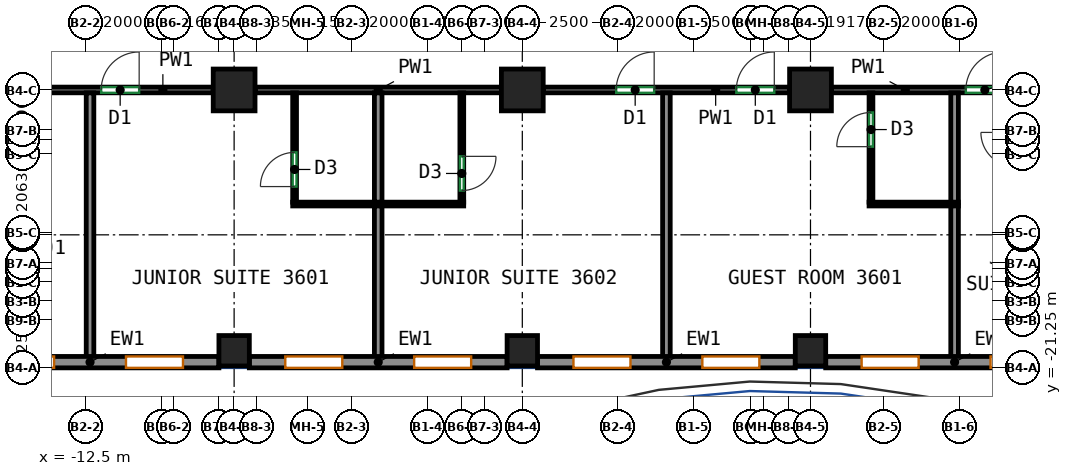
"""IFC4 building model, lengths in metres.
Left out: names, types, materials, properties, quantities, classifications, styles, units other than length and angle.
Written with IfcOpenShell. Run it as: python <this file> out.ifc"""

import sys

from ifc_helpers import new_model, si_unit, direction, frame, frame_2d, origin, origin_2d, place, context, subcontext, project, spatial, rectangle, extrude, source, transform, mapped, element, fill, save


model = new_model("IFC4")
c1 = context("Model", 3, precision=1e-05, world=origin(), true_north=direction((0.0, 1.0)))
c2 = subcontext(c1, "Body", "Model", "MODEL_VIEW")
j1 = project(units=[si_unit("LENGTHUNIT", "METRE"), si_unit("PLANEANGLEUNIT", "RADIAN")], contexts=[c1])
p1 = place(None, origin())
s1 = spatial("IfcSite", under=j1, at=p1, CompositionType="ELEMENT")
p2 = place(p1, origin())
s2 = spatial("IfcBuilding", under=s1, at=p2, CompositionType="ELEMENT")
p3 = place(p2, frame((0.0, 0.0, 157.5)))
s3 = spatial("IfcBuildingStorey", under=s2, at=p3, CompositionType="ELEMENT", Elevation=157.5)
m1 = source(origin(), c2, "Body", "SweptSolid", [
    extrude(rectangle(XDim=0.8, YDim=0.8, at=origin_2d()), origin(), (0.0, 0.0, 1.0), 3.12),
])
p4 = place(p3, frame((-8.583, -20.8, 0.0), z_axis=(0.0, 0.0, 1.0), x_axis=(1.0, 0.0, 0.0)))
e1 = element("IfcColumn", 1, at=p4, inside=s3, PredefinedType="COLUMN", context=c2, shape_type="MappedRepresentation", body=[
    mapped(m1, transform((0.0, 0.0, 0.0))),
])
m2 = source(origin(), c2, "Body", "SweptSolid", [
    extrude(rectangle(XDim=1.1, YDim=1.1, at=origin_2d()), origin(), (0.0, 0.0, 1.0), 3.12),
])
p5 = place(p3, frame((-8.583, -13.938, 0.0), z_axis=(0.0, 0.0, 1.0), x_axis=(1.0, 0.0, 0.0)))
e2 = element("IfcColumn", 2, at=p5, inside=s3, PredefinedType="COLUMN", context=c2, shape_type="MappedRepresentation", body=[
    mapped(m2, transform((0.0, 0.0, 0.0))),
])
p6 = place(p3, frame((-1.0, -20.8, 0.0), z_axis=(0.0, 0.0, 1.0), x_axis=(1.0, 0.0, 0.0)))
e3 = element("IfcColumn", 3, at=p6, inside=s3, PredefinedType="COLUMN", context=c2, shape_type="MappedRepresentation", body=[
    mapped(m1, transform((0.0, 0.0, 0.0))),
])
p7 = place(p3, frame((-1.0, -13.938, 0.0), z_axis=(0.0, 0.0, 1.0), x_axis=(1.0, 0.0, 0.0)))
e4 = element("IfcColumn", 4, at=p7, inside=s3, PredefinedType="COLUMN", context=c2, shape_type="MappedRepresentation", body=[
    mapped(m2, transform((0.0, 0.0, 0.0))),
])
p8 = place(p3, frame((6.583, -20.8, 0.0), z_axis=(0.0, 0.0, 1.0), x_axis=(1.0, 0.0, 0.0)))
e5 = element("IfcColumn", 5, at=p8, inside=s3, PredefinedType="COLUMN", context=c2, shape_type="MappedRepresentation", body=[
    mapped(m1, transform((0.0, 0.0, 0.0))),
])
p9 = place(p3, frame((6.583, -13.938, 0.0), z_axis=(0.0, 0.0, 1.0), x_axis=(1.0, 0.0, 0.0)))
e6 = element("IfcColumn", 6, at=p9, inside=s3, PredefinedType="COLUMN", context=c2, shape_type="MappedRepresentation", body=[
    mapped(m2, transform((0.0, 0.0, 0.0))),
])
m3 = source(origin(), c2, "Body", "SweptSolid", [
    extrude(rectangle(XDim=6.783, YDim=0.3, at=frame_2d((3.392, 0.0))), origin(), (0.0, 0.0, 1.0), 3.12),
])
p10 = place(p3, frame((-15.767, -21.1, 0.0), z_axis=(0.0, 0.0, 1.0), x_axis=(1.0, 0.0, 0.0)))
e7 = element("IfcWall", 7, at=p10, inside=s3, PredefinedType="SOLIDWALL", context=c2, shape_type="MappedRepresentation", body=[
    mapped(m3, transform((0.0, 0.0, 0.0))),
])
p11 = place(p10, frame((0.946, 0.0, 0.85)))
e8 = element("IfcOpeningElement", 8, at=p11, cuts=e7, PredefinedType="OPENING", context=c2, shape_type="SweptSolid", body=[
    extrude(rectangle(XDim=1.5, YDim=1.95, at=frame_2d((0.75, 0.975))), frame((0.0, 0.16, 0.0), z_axis=(0.0, -1.0, 0.0), x_axis=(1.0, 0.0, 0.0)), (0.0, 0.0, 1.0), 0.32),
])
p12 = place(p10, frame((4.338, 0.0, 0.85)))
e9 = element("IfcOpeningElement", 9, at=p12, cuts=e7, PredefinedType="OPENING", context=c2, shape_type="SweptSolid", body=[
    extrude(rectangle(XDim=1.5, YDim=1.95, at=frame_2d((0.75, 0.975))), frame((0.0, 0.16, 0.0), z_axis=(0.0, -1.0, 0.0), x_axis=(1.0, 0.0, 0.0)), (0.0, 0.0, 1.0), 0.32),
])
m4 = source(origin(), c2, "Body", "SweptSolid", [
    extrude(rectangle(XDim=6.783, YDim=0.3, at=frame_2d((3.392, 0.0))), origin(), (0.0, 0.0, 1.0), 3.12),
])
p13 = place(p3, frame((-8.183, -21.1, 0.0), z_axis=(0.0, 0.0, 1.0), x_axis=(1.0, 0.0, 0.0)))
e10 = element("IfcWall", 10, at=p13, inside=s3, PredefinedType="SOLIDWALL", context=c2, shape_type="MappedRepresentation", body=[
    mapped(m4, transform((0.0, 0.0, 0.0))),
])
p14 = place(p13, frame((0.946, 0.0, 0.85)))
e11 = element("IfcOpeningElement", 11, at=p14, cuts=e10, PredefinedType="OPENING", context=c2, shape_type="SweptSolid", body=[
    extrude(rectangle(XDim=1.5, YDim=1.95, at=frame_2d((0.75, 0.975))), frame((0.0, 0.16, 0.0), z_axis=(0.0, -1.0, 0.0), x_axis=(1.0, 0.0, 0.0)), (0.0, 0.0, 1.0), 0.32),
])
p15 = place(p13, frame((4.337, 0.0, 0.85)))
e12 = element("IfcOpeningElement", 12, at=p15, cuts=e10, PredefinedType="OPENING", context=c2, shape_type="SweptSolid", body=[
    extrude(rectangle(XDim=1.5, YDim=1.95, at=frame_2d((0.75, 0.975))), frame((0.0, 0.16, 0.0), z_axis=(0.0, -1.0, 0.0), x_axis=(1.0, 0.0, 0.0)), (0.0, 0.0, 1.0), 0.32),
])
p16 = place(p3, frame((-0.6, -21.1, 0.0), z_axis=(0.0, 0.0, 1.0), x_axis=(1.0, 0.0, 0.0)))
e13 = element("IfcWall", 13, at=p16, inside=s3, PredefinedType="SOLIDWALL", context=c2, shape_type="MappedRepresentation", body=[
    mapped(m4, transform((0.0, 0.0, 0.0))),
])
p17 = place(p16, frame((0.946, 0.0, 0.85)))
e14 = element("IfcOpeningElement", 14, at=p17, cuts=e13, PredefinedType="OPENING", context=c2, shape_type="SweptSolid", body=[
    extrude(rectangle(XDim=1.5, YDim=1.95, at=frame_2d((0.75, 0.975))), frame((0.0, 0.16, 0.0), z_axis=(0.0, -1.0, 0.0), x_axis=(1.0, 0.0, 0.0)), (0.0, 0.0, 1.0), 0.32),
])
p18 = place(p16, frame((4.337, 0.0, 0.85)))
e15 = element("IfcOpeningElement", 15, at=p18, cuts=e13, PredefinedType="OPENING", context=c2, shape_type="SweptSolid", body=[
    extrude(rectangle(XDim=1.5, YDim=1.95, at=frame_2d((0.75, 0.975))), frame((0.0, 0.16, 0.0), z_axis=(0.0, -1.0, 0.0), x_axis=(1.0, 0.0, 0.0)), (0.0, 0.0, 1.0), 0.32),
])
p19 = place(p3, frame((6.983, -21.1, 0.0), z_axis=(0.0, 0.0, 1.0), x_axis=(1.0, 0.0, 0.0)))
e16 = element("IfcWall", 16, at=p19, inside=s3, PredefinedType="SOLIDWALL", context=c2, shape_type="MappedRepresentation", body=[
    mapped(m3, transform((0.0, 0.0, 0.0))),
])
p20 = place(p19, frame((0.946, 0.0, 0.85)))
e17 = element("IfcOpeningElement", 17, at=p20, cuts=e16, PredefinedType="OPENING", context=c2, shape_type="SweptSolid", body=[
    extrude(rectangle(XDim=1.5, YDim=1.95, at=frame_2d((0.75, 0.975))), frame((0.0, 0.16, 0.0), z_axis=(0.0, -1.0, 0.0), x_axis=(1.0, 0.0, 0.0)), (0.0, 0.0, 1.0), 0.32),
])
p21 = place(p19, frame((4.338, 0.0, 0.85)))
e18 = element("IfcOpeningElement", 18, at=p21, cuts=e16, PredefinedType="OPENING", context=c2, shape_type="SweptSolid", body=[
    extrude(rectangle(XDim=1.5, YDim=1.95, at=frame_2d((0.75, 0.975))), frame((0.0, 0.16, 0.0), z_axis=(0.0, -1.0, 0.0), x_axis=(1.0, 0.0, 0.0)), (0.0, 0.0, 1.0), 0.32),
])
p22 = place(p3, frame((-13.55, -13.938, 0.0), z_axis=(0.0, 0.0, 1.0), x_axis=(1.0, 0.0, 0.0)))
e19 = element("IfcWall", 19, at=p22, inside=s3, PredefinedType="PARTITIONING", context=c2, shape_type="SweptSolid", body=[
    extrude(rectangle(XDim=4.417, YDim=0.15, at=frame_2d((2.208, 0.0))), origin(), (0.0, 0.0, 1.0), 3.12),
])
p23 = place(p22, frame((1.468, 0.0, 0.0)))
e20 = element("IfcOpeningElement", 20, at=p23, cuts=e19, PredefinedType="OPENING", context=c2, shape_type="SweptSolid", body=[
    extrude(rectangle(XDim=1.0, YDim=2.1, at=frame_2d((0.5, 1.05))), frame((0.0, 0.085, 0.0), z_axis=(0.0, -1.0, 0.0), x_axis=(1.0, 0.0, 0.0)), (0.0, 0.0, 1.0), 0.17),
])
p24 = place(p3, frame((-8.033, -13.938, 0.0), z_axis=(0.0, 0.0, 1.0), x_axis=(1.0, 0.0, 0.0)))
e21 = element("IfcWall", 21, at=p24, inside=s3, PredefinedType="PARTITIONING", context=c2, shape_type="SweptSolid", body=[
    extrude(rectangle(XDim=6.483, YDim=0.15, at=frame_2d((3.241, 0.0))), origin(), (0.0, 0.0, 1.0), 3.12),
])
p25 = place(p3, frame((-0.45, -13.938, 0.0), z_axis=(0.0, 0.0, 1.0), x_axis=(1.0, 0.0, 0.0)))
e22 = element("IfcWall", 22, at=p25, inside=s3, PredefinedType="PARTITIONING", context=c2, shape_type="SweptSolid", body=[
    extrude(rectangle(XDim=6.483, YDim=0.15, at=frame_2d((3.241, 0.0))), origin(), (0.0, 0.0, 1.0), 3.12),
])
p26 = place(p25, frame((1.92, 0.0, 0.0)))
e23 = element("IfcOpeningElement", 23, at=p26, cuts=e22, PredefinedType="OPENING", context=c2, shape_type="SweptSolid", body=[
    extrude(rectangle(XDim=1.0, YDim=2.1, at=frame_2d((0.5, 1.05))), frame((0.0, 0.085, 0.0), z_axis=(0.0, -1.0, 0.0), x_axis=(1.0, 0.0, 0.0)), (0.0, 0.0, 1.0), 0.17),
])
p27 = place(p25, frame((5.081, 0.0, 0.0)))
e24 = element("IfcOpeningElement", 24, at=p27, cuts=e22, PredefinedType="OPENING", context=c2, shape_type="SweptSolid", body=[
    extrude(rectangle(XDim=1.0, YDim=2.1, at=frame_2d((0.5, 1.05))), frame((0.0, 0.085, 0.0), z_axis=(0.0, -1.0, 0.0), x_axis=(1.0, 0.0, 0.0)), (0.0, 0.0, 1.0), 0.17),
])
p28 = place(p3, frame((7.133, -13.938, 0.0), z_axis=(0.0, 0.0, 1.0), x_axis=(1.0, 0.0, 0.0)))
e25 = element("IfcWall", 25, at=p28, inside=s3, PredefinedType="PARTITIONING", context=c2, shape_type="SweptSolid", body=[
    extrude(rectangle(XDim=6.484, YDim=0.15, at=frame_2d((3.242, 0.0))), origin(), (0.0, 0.0, 1.0), 3.12),
])
p29 = place(p28, frame((3.538, 0.0, 0.0)))
e26 = element("IfcOpeningElement", 26, at=p29, cuts=e25, PredefinedType="OPENING", context=c2, shape_type="SweptSolid", body=[
    extrude(rectangle(XDim=1.0, YDim=2.1, at=frame_2d((0.5, 1.05))), frame((0.0, 0.085, 0.0), z_axis=(0.0, -1.0, 0.0), x_axis=(1.0, 0.0, 0.0)), (0.0, 0.0, 1.0), 0.17),
])
p30 = place(p3, frame((-12.375, -21.0, 0.0), z_axis=(0.0, 0.0, 1.0), x_axis=(0.0, 1.0, 0.0)))
e27 = element("IfcWall", 27, at=p30, inside=s3, PredefinedType="PARTITIONING", context=c2, shape_type="SweptSolid", body=[
    extrude(rectangle(XDim=6.985, YDim=0.2, at=frame_2d((3.493, 0.0))), origin(), (0.0, 0.0, 1.0), 3.12),
])
p31 = place(p3, frame((-6.992, -16.89, 0.0), z_axis=(0.0, 0.0, 1.0), x_axis=(0.0, 1.0, 0.0)))
e28 = element("IfcWall", 28, at=p31, inside=s3, PredefinedType="PARTITIONING", context=c2, shape_type="SweptSolid", body=[
    extrude(rectangle(XDim=2.875, YDim=0.1, at=frame_2d((1.438, 0.0))), origin(), (0.0, 0.0, 1.0), 3.12),
])
p32 = place(p31, frame((0.41, 0.0, 0.0)))
e29 = element("IfcOpeningElement", 29, at=p32, cuts=e28, PredefinedType="OPENING", context=c2, shape_type="SweptSolid", body=[
    extrude(rectangle(XDim=0.9, YDim=2.1, at=frame_2d((0.45, 1.05))), frame((0.0, 0.06, 0.0), z_axis=(0.0, -1.0, 0.0), x_axis=(1.0, 0.0, 0.0)), (0.0, 0.0, 1.0), 0.12),
])
p33 = place(p3, frame((-7.042, -16.94, 0.0), z_axis=(0.0, 0.0, 1.0), x_axis=(1.0, 0.0, 0.0)))
e30 = element("IfcWall", 30, at=p33, inside=s3, PredefinedType="PARTITIONING", context=c2, shape_type="SweptSolid", body=[
    extrude(rectangle(XDim=4.5, YDim=0.1, at=frame_2d((2.25, 0.0))), origin(), (0.0, 0.0, 1.0), 3.12),
])
p34 = place(p3, frame((-4.792, -21.0, 0.0), z_axis=(0.0, 0.0, 1.0), x_axis=(0.0, 1.0, 0.0)))
e31 = element("IfcWall", 31, at=p34, inside=s3, PredefinedType="PARTITIONING", context=c2, shape_type="SweptSolid", body=[
    extrude(rectangle(XDim=4.01, YDim=0.2, at=frame_2d((2.005, 0.0))), origin(), (0.0, 0.0, 1.0), 3.12),
])
p35 = place(p3, frame((-4.792, -16.89, 0.0), z_axis=(0.0, 0.0, 1.0), x_axis=(0.0, 1.0, 0.0)))
e32 = element("IfcWall", 32, at=p35, inside=s3, PredefinedType="PARTITIONING", context=c2, shape_type="SweptSolid", body=[
    extrude(rectangle(XDim=2.875, YDim=0.2, at=frame_2d((1.438, 0.0))), origin(), (0.0, 0.0, 1.0), 3.12),
])
p36 = place(p3, frame((-2.592, -14.015, 0.0), z_axis=(0.0, 0.0, 1.0), x_axis=(0.0, -1.0, 0.0)))
e33 = element("IfcWall", 33, at=p36, inside=s3, PredefinedType="PARTITIONING", context=c2, shape_type="SweptSolid", body=[
    extrude(rectangle(XDim=2.875, YDim=0.1, at=frame_2d((1.438, 0.0))), origin(), (0.0, 0.0, 1.0), 3.12),
])
p37 = place(p36, frame((1.67, 0.0, 0.0)))
e34 = element("IfcOpeningElement", 34, at=p37, cuts=e33, PredefinedType="OPENING", context=c2, shape_type="SweptSolid", body=[
    extrude(rectangle(XDim=0.9, YDim=2.1, at=frame_2d((0.45, 1.05))), frame((0.0, 0.06, 0.0), z_axis=(0.0, -1.0, 0.0), x_axis=(1.0, 0.0, 0.0)), (0.0, 0.0, 1.0), 0.12),
])
p38 = place(p3, frame((2.792, -21.0, 0.0), z_axis=(0.0, 0.0, 1.0), x_axis=(0.0, 1.0, 0.0)))
e35 = element("IfcWall", 35, at=p38, inside=s3, PredefinedType="PARTITIONING", context=c2, shape_type="SweptSolid", body=[
    extrude(rectangle(XDim=6.985, YDim=0.2, at=frame_2d((3.493, 0.0))), origin(), (0.0, 0.0, 1.0), 3.12),
])
p39 = place(p3, frame((8.175, -16.89, 0.0), z_axis=(0.0, 0.0, 1.0), x_axis=(0.0, 1.0, 0.0)))
e36 = element("IfcWall", 36, at=p39, inside=s3, PredefinedType="PARTITIONING", context=c2, shape_type="SweptSolid", body=[
    extrude(rectangle(XDim=2.875, YDim=0.1, at=frame_2d((1.438, 0.0))), origin(), (0.0, 0.0, 1.0), 3.12),
])
p40 = place(p39, frame((1.46, 0.0, 0.0)))
e37 = element("IfcOpeningElement", 37, at=p40, cuts=e36, PredefinedType="OPENING", context=c2, shape_type="SweptSolid", body=[
    extrude(rectangle(XDim=0.9, YDim=2.1, at=frame_2d((0.45, 1.05))), frame((0.0, 0.06, 0.0), z_axis=(0.0, -1.0, 0.0), x_axis=(1.0, 0.0, 0.0)), (0.0, 0.0, 1.0), 0.12),
])
p41 = place(p3, frame((8.125, -16.94, 0.0), z_axis=(0.0, 0.0, 1.0), x_axis=(1.0, 0.0, 0.0)))
e38 = element("IfcWall", 38, at=p41, inside=s3, PredefinedType="PARTITIONING", context=c2, shape_type="SweptSolid", body=[
    extrude(rectangle(XDim=2.35, YDim=0.1, at=frame_2d((1.175, 0.0))), origin(), (0.0, 0.0, 1.0), 3.12),
])
p42 = place(p3, frame((10.375, -21.0, 0.0), z_axis=(0.0, 0.0, 1.0), x_axis=(0.0, 1.0, 0.0)))
e39 = element("IfcWall", 39, at=p42, inside=s3, PredefinedType="PARTITIONING", context=c2, shape_type="SweptSolid", body=[
    extrude(rectangle(XDim=4.01, YDim=0.2, at=frame_2d((2.005, 0.0))), origin(), (0.0, 0.0, 1.0), 3.12),
])
p43 = place(p3, frame((10.375, -16.89, 0.0), z_axis=(0.0, 0.0, 1.0), x_axis=(0.0, 1.0, 0.0)))
e40 = element("IfcWall", 40, at=p43, inside=s3, PredefinedType="PARTITIONING", context=c2, shape_type="SweptSolid", body=[
    extrude(rectangle(XDim=2.875, YDim=0.2, at=frame_2d((1.438, 0.0))), origin(), (0.0, 0.0, 1.0), 3.12),
])
p44 = place(p11, origin())
e41 = element("IfcWindow", 41, at=p44, inside=s3, PartitioningType="SINGLE_PANEL", PredefinedType="WINDOW", context=c2, shape_type="SweptSolid", body=[
    extrude(rectangle(XDim=1.5, YDim=1.95, at=frame_2d((0.75, 0.975))), frame((0.0, 0.03, 0.0), z_axis=(0.0, -1.0, 0.0), x_axis=(1.0, 0.0, 0.0)), (0.0, 0.0, 1.0), 0.06),
])
fill(e8, e41)
p45 = place(p12, origin())
e42 = element("IfcWindow", 42, at=p45, inside=s3, PartitioningType="SINGLE_PANEL", PredefinedType="WINDOW", context=c2, shape_type="SweptSolid", body=[
    extrude(rectangle(XDim=1.5, YDim=1.95, at=frame_2d((0.75, 0.975))), frame((0.0, 0.03, 0.0), z_axis=(0.0, -1.0, 0.0), x_axis=(1.0, 0.0, 0.0)), (0.0, 0.0, 1.0), 0.06),
])
fill(e9, e42)
p46 = place(p14, origin())
e43 = element("IfcWindow", 43, at=p46, inside=s3, PartitioningType="SINGLE_PANEL", PredefinedType="WINDOW", context=c2, shape_type="SweptSolid", body=[
    extrude(rectangle(XDim=1.5, YDim=1.95, at=frame_2d((0.75, 0.975))), frame((0.0, 0.03, 0.0), z_axis=(0.0, -1.0, 0.0), x_axis=(1.0, 0.0, 0.0)), (0.0, 0.0, 1.0), 0.06),
])
fill(e11, e43)
p47 = place(p15, origin())
e44 = element("IfcWindow", 44, at=p47, inside=s3, PartitioningType="SINGLE_PANEL", PredefinedType="WINDOW", context=c2, shape_type="SweptSolid", body=[
    extrude(rectangle(XDim=1.5, YDim=1.95, at=frame_2d((0.75, 0.975))), frame((0.0, 0.03, 0.0), z_axis=(0.0, -1.0, 0.0), x_axis=(1.0, 0.0, 0.0)), (0.0, 0.0, 1.0), 0.06),
])
fill(e12, e44)
p48 = place(p17, origin())
e45 = element("IfcWindow", 45, at=p48, inside=s3, PartitioningType="SINGLE_PANEL", PredefinedType="WINDOW", context=c2, shape_type="SweptSolid", body=[
    extrude(rectangle(XDim=1.5, YDim=1.95, at=frame_2d((0.75, 0.975))), frame((0.0, 0.03, 0.0), z_axis=(0.0, -1.0, 0.0), x_axis=(1.0, 0.0, 0.0)), (0.0, 0.0, 1.0), 0.06),
])
fill(e14, e45)
p49 = place(p18, origin())
e46 = element("IfcWindow", 46, at=p49, inside=s3, PartitioningType="SINGLE_PANEL", PredefinedType="WINDOW", context=c2, shape_type="SweptSolid", body=[
    extrude(rectangle(XDim=1.5, YDim=1.95, at=frame_2d((0.75, 0.975))), frame((0.0, 0.03, 0.0), z_axis=(0.0, -1.0, 0.0), x_axis=(1.0, 0.0, 0.0)), (0.0, 0.0, 1.0), 0.06),
])
fill(e15, e46)
p50 = place(p20, origin())
e47 = element("IfcWindow", 47, at=p50, inside=s3, PartitioningType="SINGLE_PANEL", PredefinedType="WINDOW", context=c2, shape_type="SweptSolid", body=[
    extrude(rectangle(XDim=1.5, YDim=1.95, at=frame_2d((0.75, 0.975))), frame((0.0, 0.03, 0.0), z_axis=(0.0, -1.0, 0.0), x_axis=(1.0, 0.0, 0.0)), (0.0, 0.0, 1.0), 0.06),
])
fill(e17, e47)
p51 = place(p21, origin())
e48 = element("IfcWindow", 48, at=p51, inside=s3, PartitioningType="SINGLE_PANEL", PredefinedType="WINDOW", context=c2, shape_type="SweptSolid", body=[
    extrude(rectangle(XDim=1.5, YDim=1.95, at=frame_2d((0.75, 0.975))), frame((0.0, 0.03, 0.0), z_axis=(0.0, -1.0, 0.0), x_axis=(1.0, 0.0, 0.0)), (0.0, 0.0, 1.0), 0.06),
])
fill(e18, e48)
p52 = place(p37, origin())
e49 = element("IfcDoor", 49, at=p52, inside=s3, OperationType="SINGLE_SWING_LEFT", PredefinedType="DOOR", context=c2, shape_type="SweptSolid", body=[
    extrude(rectangle(XDim=0.9, YDim=2.1, at=frame_2d((0.45, 1.05))), frame((0.0, 0.025, 0.0), z_axis=(0.0, -1.0, 0.0), x_axis=(1.0, 0.0, 0.0)), (0.0, 0.0, 1.0), 0.05),
])
fill(e34, e49)
p53 = place(p32, origin())
e50 = element("IfcDoor", 50, at=p53, inside=s3, OperationType="SINGLE_SWING_LEFT", PredefinedType="DOOR", context=c2, shape_type="SweptSolid", body=[
    extrude(rectangle(XDim=0.9, YDim=2.1, at=frame_2d((0.45, 1.05))), frame((0.0, 0.025, 0.0), z_axis=(0.0, -1.0, 0.0), x_axis=(1.0, 0.0, 0.0)), (0.0, 0.0, 1.0), 0.05),
])
fill(e29, e50)
p54 = place(p40, origin())
e51 = element("IfcDoor", 51, at=p54, inside=s3, OperationType="SINGLE_SWING_LEFT", PredefinedType="DOOR", context=c2, shape_type="SweptSolid", body=[
    extrude(rectangle(XDim=0.9, YDim=2.1, at=frame_2d((0.45, 1.05))), frame((0.0, 0.025, 0.0), z_axis=(0.0, -1.0, 0.0), x_axis=(1.0, 0.0, 0.0)), (0.0, 0.0, 1.0), 0.05),
])
fill(e37, e51)
p55 = place(p23, origin())
e52 = element("IfcDoor", 52, at=p55, inside=s3, OperationType="SINGLE_SWING_RIGHT", PredefinedType="DOOR", context=c2, shape_type="SweptSolid", body=[
    extrude(rectangle(XDim=1.0, YDim=2.1, at=frame_2d((0.5, 1.05))), frame((0.0, 0.025, 0.0), z_axis=(0.0, -1.0, 0.0), x_axis=(1.0, 0.0, 0.0)), (0.0, 0.0, 1.0), 0.05),
])
fill(e20, e52)
p56 = place(p26, origin())
e53 = element("IfcDoor", 53, at=p56, inside=s3, OperationType="SINGLE_SWING_RIGHT", PredefinedType="DOOR", context=c2, shape_type="SweptSolid", body=[
    extrude(rectangle(XDim=1.0, YDim=2.1, at=frame_2d((0.5, 1.05))), frame((0.0, 0.025, 0.0), z_axis=(0.0, -1.0, 0.0), x_axis=(1.0, 0.0, 0.0)), (0.0, 0.0, 1.0), 0.05),
])
fill(e23, e53)
p57 = place(p27, origin())
e54 = element("IfcDoor", 54, at=p57, inside=s3, OperationType="SINGLE_SWING_RIGHT", PredefinedType="DOOR", context=c2, shape_type="SweptSolid", body=[
    extrude(rectangle(XDim=1.0, YDim=2.1, at=frame_2d((0.5, 1.05))), frame((0.0, 0.025, 0.0), z_axis=(0.0, -1.0, 0.0), x_axis=(1.0, 0.0, 0.0)), (0.0, 0.0, 1.0), 0.05),
])
fill(e24, e54)
p58 = place(p29, origin())
e55 = element("IfcDoor", 55, at=p58, inside=s3, OperationType="SINGLE_SWING_RIGHT", PredefinedType="DOOR", context=c2, shape_type="SweptSolid", body=[
    extrude(rectangle(XDim=1.0, YDim=2.1, at=frame_2d((0.5, 1.05))), frame((0.0, 0.025, 0.0), z_axis=(0.0, -1.0, 0.0), x_axis=(1.0, 0.0, 0.0)), (0.0, 0.0, 1.0), 0.05),
])
fill(e26, e55)
save(model, sys.argv[1])
